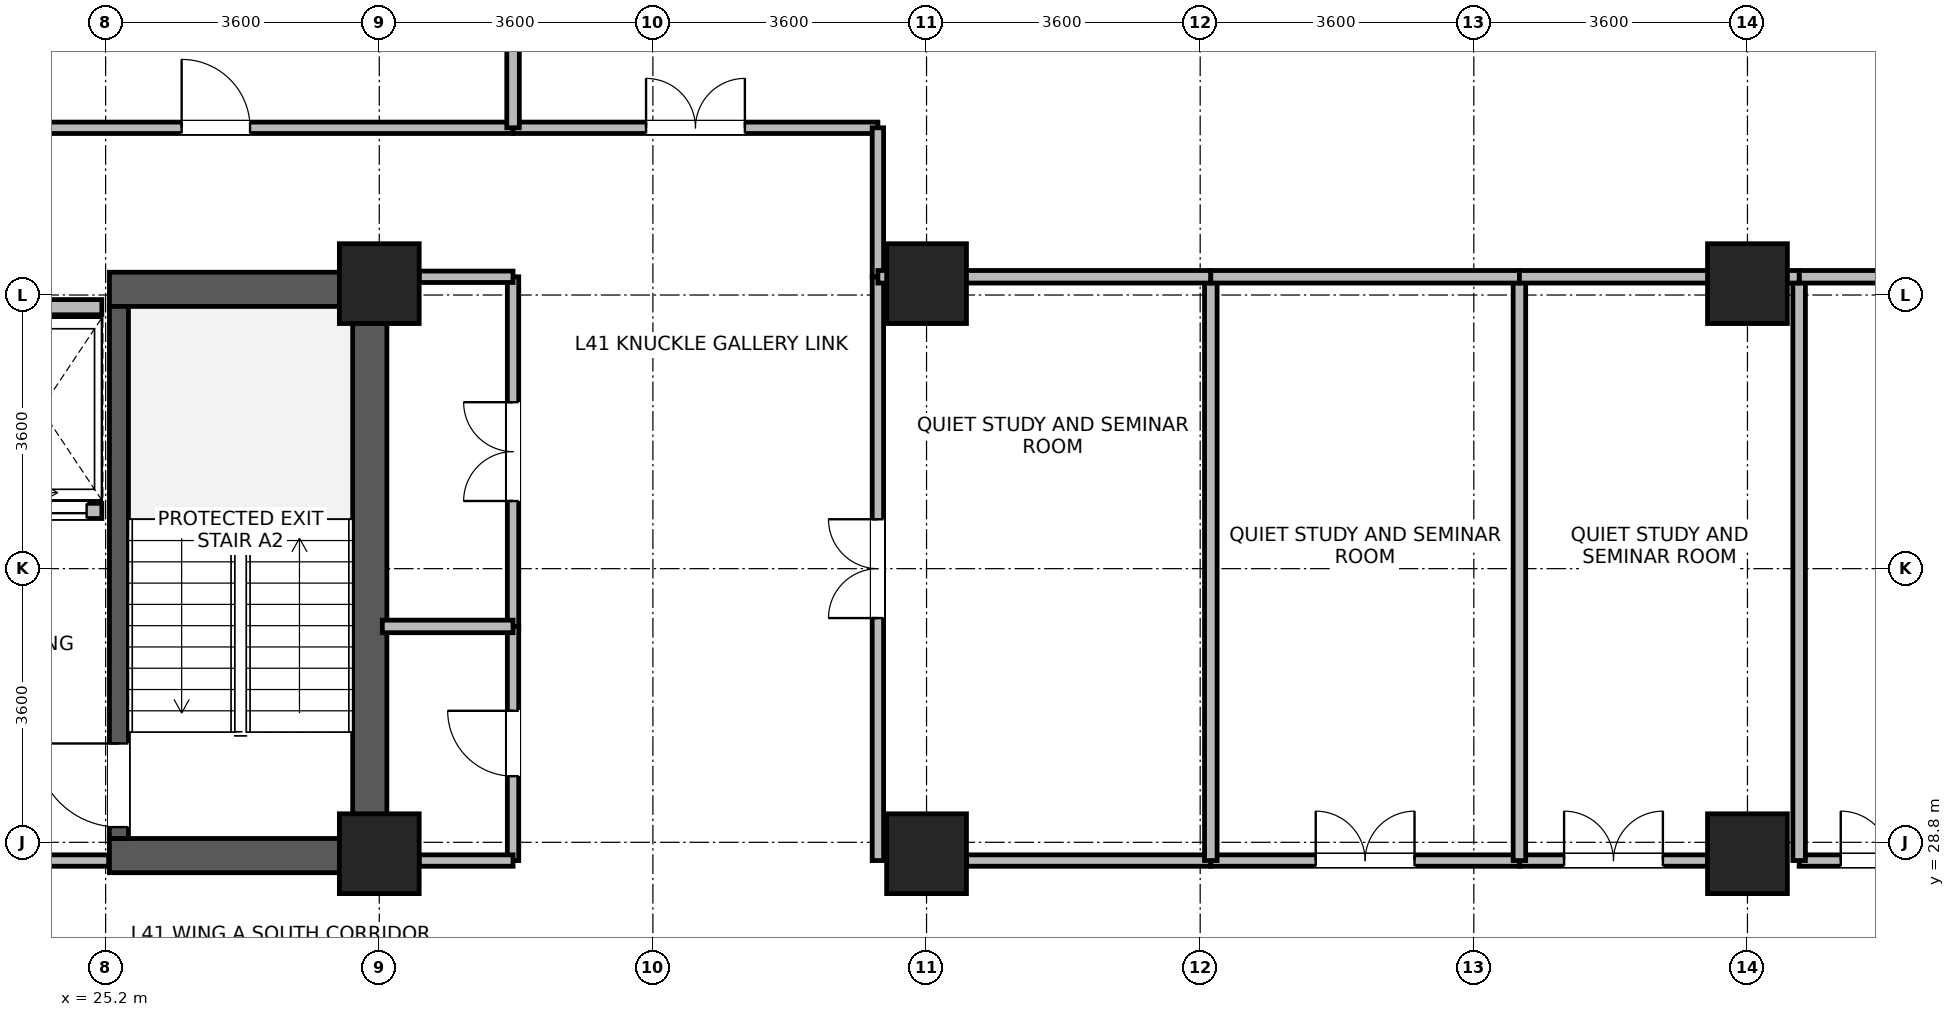
"""IFC4 building model, lengths in metres.
Left out: names, types, materials, properties, quantities, classifications, styles, units other than length and angle.
Written with IfcOpenShell. Run it as: python <this file> out.ifc"""

import sys

from ifc_helpers import new_model, si_unit, direction, frame, frame_2d, origin, origin_2d, place, context, subcontext, project, spatial, rectangle, extrude, source, transform, mapped, element, fill, save


model = new_model("IFC4")
c1 = context("Model", 3, precision=1e-05, world=origin(), true_north=direction((0.0, 1.0)))
c2 = subcontext(c1, "Body", "Model", "MODEL_VIEW")
j1 = project(units=[si_unit("LENGTHUNIT", "METRE"), si_unit("PLANEANGLEUNIT", "RADIAN")], contexts=[c1])
p1 = place(None, origin())
s1 = spatial("IfcSite", under=j1, at=p1, CompositionType="ELEMENT")
p2 = place(p1, origin())
s2 = spatial("IfcBuilding", under=s1, at=p2, CompositionType="ELEMENT")
p3 = place(p2, frame((0.0, 0.0, 162.4)))
s3 = spatial("IfcBuildingStorey", under=s2, at=p3, CompositionType="ELEMENT", Elevation=162.4)
p4 = place(p3, frame((28.675, 28.4, 0.0), z_axis=(0.0, 0.0, 1.0), x_axis=(0.0, 1.0, 0.0)))
e1 = element("IfcWall", 1, at=p4, inside=s3, PredefinedType="SHEAR", context=c2, shape_type="SweptSolid", body=[
    extrude(rectangle(XDim=7.9, YDim=0.45, at=frame_2d((3.95, 0.0))), origin(), (0.0, 0.0, 1.0), 3.46),
])
for number, where, z_axis, x_axis in (
    (2, (25.25, 28.625, 0.0), (0.0, 0.0, 1.0), (1.0, 0.0, 0.0)),
    (3, (25.25, 36.075, 0.0), (0.0, 0.0, 1.0), (1.0, 0.0, 0.0)),
):
    element("IfcWall", number, at=place(p3, frame(where, z_axis=z_axis, x_axis=x_axis)), inside=s3, PredefinedType="SHEAR", context=c2, shape_type="SweptSolid", body=[
        extrude(rectangle(XDim=3.2, YDim=0.45, at=frame_2d((1.6, 0.0))), origin(), (0.0, 0.0, 1.0), 3.46),
    ])
p5 = place(p3, frame((25.375, 28.85, 0.0), z_axis=(0.0, 0.0, 1.0), x_axis=(0.0, 1.0, 0.0)))
e4 = element("IfcWall", 4, at=p5, inside=s3, PredefinedType="SHEAR", context=c2, shape_type="SweptSolid", body=[
    extrude(rectangle(XDim=7.0, YDim=0.25, at=frame_2d((3.5, 0.0))), origin(), (0.0, 0.0, 1.0), 3.46),
])
p6 = place(p5, frame((0.15, 0.0, 0.0)))
e5 = element("IfcOpeningElement", 5, at=p6, cuts=e4, PredefinedType="OPENING", context=c2, shape_type="SweptSolid", body=[
    extrude(rectangle(XDim=1.1, YDim=2.08, at=frame_2d((0.55, 1.04))), frame((0.0, 0.135, 0.0), z_axis=(0.0, -1.0, 0.0), x_axis=(1.0, 0.0, 0.0)), (0.0, 0.0, 1.0), 0.27),
])
m1 = source(origin(), c2, "Body", "SweptSolid", [
    extrude(rectangle(XDim=1.05, YDim=1.05, at=origin_2d()), origin(), (0.0, 0.0, 1.0), 3.7),
])
for number, where, z_axis, x_axis in (
    (6, (28.8, 28.65, 0.0), (0.0, 0.0, 1.0), (1.0, 0.0, 0.0)),
    (7, (28.8, 36.15, 0.0), (0.0, 0.0, 1.0), (1.0, 0.0, 0.0)),
    (8, (36.0, 28.65, 0.0), (0.0, 0.0, 1.0), (1.0, 0.0, 0.0)),
    (9, (36.0, 36.15, 0.0), (0.0, 0.0, 1.0), (1.0, 0.0, 0.0)),
    (10, (46.8, 28.65, 0.0), (0.0, 0.0, 1.0), (1.0, 0.0, 0.0)),
    (11, (46.8, 36.15, 0.0), (0.0, 0.0, 1.0), (1.0, 0.0, 0.0)),
):
    element("IfcColumn", number, at=place(p3, frame(where, z_axis=z_axis, x_axis=x_axis)), inside=s3, PredefinedType="COLUMN", context=c2, shape_type="MappedRepresentation", body=[
        mapped(m1, transform((0.0, 0.0, 0.0), x_axis=(1.0, 0.0, 0.0), y_axis=(0.0, 1.0, 0.0), z_axis=(0.0, 0.0, 1.0), scale=1.0)),
    ])
p7 = place(p3, frame((23.55, 33.16, 0.0), z_axis=(0.0, 0.0, 1.0), x_axis=(1.0, 0.0, 0.0)))
e12 = element("IfcWall", 12, at=p7, inside=s3, PredefinedType="PARTITIONING", context=c2, shape_type="SweptSolid", body=[
    extrude(rectangle(XDim=1.6, YDim=0.2, at=frame_2d((0.8, 0.0))), origin(), (0.0, 0.0, 1.0), 3.44),
])
p8 = place(p7, frame((0.2, 0.0, 0.0)))
e13 = element("IfcOpeningElement", 13, at=p8, cuts=e12, PredefinedType="OPENING", context=c2, shape_type="SweptSolid", body=[
    extrude(rectangle(XDim=1.2, YDim=2.12, at=frame_2d((0.6, 1.06))), frame((0.0, 0.11, 0.0), z_axis=(0.0, -1.0, 0.0), x_axis=(1.0, 0.0, 0.0)), (0.0, 0.0, 1.0), 0.22),
])
p9 = place(p3, frame((23.55, 35.84, 0.0), z_axis=(0.0, 0.0, 1.0), x_axis=(1.0, 0.0, 0.0)))
e14 = element("IfcWall", 14, at=p9, inside=s3, PredefinedType="PARTITIONING", context=c2, shape_type="SweptSolid", body=[
    extrude(rectangle(XDim=1.6, YDim=0.2, at=frame_2d((0.8, 0.0))), origin(), (0.0, 0.0, 1.0), 2.44),
])
p10 = place(p3, frame((22.74, 38.2, 0.0), z_axis=(0.0, 0.0, 1.0), x_axis=(1.0, 0.0, 0.0)))
e15 = element("IfcWall", 15, at=p10, inside=s3, PredefinedType="PARTITIONING", context=c2, shape_type="SweptSolid", body=[
    extrude(rectangle(XDim=7.82, YDim=0.15, at=frame_2d((3.91, 0.0))), origin(), (0.0, 0.0, 1.0), 3.44),
])
p11 = place(p10, frame((3.46, 0.0, 0.0)))
e16 = element("IfcOpeningElement", 16, at=p11, cuts=e15, PredefinedType="OPENING", context=c2, shape_type="SweptSolid", body=[
    extrude(rectangle(XDim=0.9, YDim=2.08, at=frame_2d((0.45, 1.04))), frame((0.0, 0.085, 0.0), z_axis=(0.0, -1.0, 0.0), x_axis=(1.0, 0.0, 0.0)), (0.0, 0.0, 1.0), 0.17),
])
p12 = place(p3, frame((35.36, 28.56, 0.0), z_axis=(0.0, 0.0, 1.0), x_axis=(0.0, 1.0, 0.0)))
e17 = element("IfcWall", 17, at=p12, inside=s3, PredefinedType="PARTITIONING", context=c2, shape_type="SweptSolid", body=[
    extrude(rectangle(XDim=7.68, YDim=0.15, at=frame_2d((3.84, 0.0))), origin(), (0.0, 0.0, 1.0), 3.44),
])
p13 = place(p12, frame((3.19, 0.0, 0.0)))
e18 = element("IfcOpeningElement", 18, at=p13, cuts=e17, PredefinedType="OPENING", context=c2, shape_type="SweptSolid", body=[
    extrude(rectangle(XDim=1.3, YDim=2.12, at=frame_2d((0.65, 1.06))), frame((0.0, 0.085, 0.0), z_axis=(0.0, -1.0, 0.0), x_axis=(1.0, 0.0, 0.0)), (0.0, 0.0, 1.0), 0.17),
])
p14 = place(p3, frame((47.48, 28.56, 0.0), z_axis=(0.0, 0.0, 1.0), x_axis=(1.0, 0.0, 0.0)))
e19 = element("IfcWall", 19, at=p14, inside=s3, PredefinedType="PARTITIONING", context=c2, shape_type="SweptSolid", body=[
    extrude(rectangle(XDim=2.395, YDim=0.15, at=frame_2d((1.198, 0.0))), origin(), (0.0, 0.0, 1.0), 2.84),
])
p15 = place(p14, frame((0.548, 0.0, 0.0)))
e20 = element("IfcOpeningElement", 20, at=p15, cuts=e19, PredefinedType="OPENING", context=c2, shape_type="SweptSolid", body=[
    extrude(rectangle(XDim=1.3, YDim=2.12, at=frame_2d((0.65, 1.06))), frame((0.0, 0.085, 0.0), z_axis=(0.0, -1.0, 0.0), x_axis=(1.0, 0.0, 0.0)), (0.0, 0.0, 1.0), 0.17),
])
p16 = place(p3, frame((30.56, 38.2, 0.0), z_axis=(0.0, 0.0, 1.0), x_axis=(1.0, 0.0, 0.0)))
e21 = element("IfcWall", 21, at=p16, inside=s3, PredefinedType="PARTITIONING", context=c2, shape_type="SweptSolid", body=[
    extrude(rectangle(XDim=4.8, YDim=0.15, at=frame_2d((2.4, 0.0))), origin(), (0.0, 0.0, 1.0), 3.44),
])
p17 = place(p16, frame((1.75, 0.0, 0.0)))
e22 = element("IfcOpeningElement", 22, at=p17, cuts=e21, PredefinedType="OPENING", context=c2, shape_type="SweptSolid", body=[
    extrude(rectangle(XDim=1.3, YDim=2.12, at=frame_2d((0.65, 1.06))), frame((0.0, 0.085, 0.0), z_axis=(0.0, -1.0, 0.0), x_axis=(1.0, 0.0, 0.0)), (0.0, 0.0, 1.0), 0.17),
])
p18 = place(p3, frame((30.56, 31.64, 0.0), z_axis=(0.0, 0.0, 1.0), x_axis=(0.0, 1.0, 0.0)))
e23 = element("IfcWall", 23, at=p18, inside=s3, PredefinedType="PARTITIONING", context=c2, shape_type="SweptSolid", body=[
    extrude(rectangle(XDim=4.6, YDim=0.15, at=frame_2d((2.3, 0.0))), origin(), (0.0, 0.0, 1.0), 3.44),
])
p19 = place(p18, frame((1.65, 0.0, 0.0)))
e24 = element("IfcOpeningElement", 24, at=p19, cuts=e23, PredefinedType="OPENING", context=c2, shape_type="SweptSolid", body=[
    extrude(rectangle(XDim=1.3, YDim=2.12, at=frame_2d((0.65, 1.06))), frame((0.0, 0.085, 0.0), z_axis=(0.0, -1.0, 0.0), x_axis=(1.0, 0.0, 0.0)), (0.0, 0.0, 1.0), 0.17),
])
p20 = place(p3, frame((36.525, 28.56, 0.0), z_axis=(0.0, 0.0, 1.0), x_axis=(1.0, 0.0, 0.0)))
e25 = element("IfcWall", 25, at=p20, inside=s3, PredefinedType="PARTITIONING", context=c2, shape_type="SweptSolid", body=[
    extrude(rectangle(XDim=3.215, YDim=0.15, at=frame_2d((1.607, 0.0))), origin(), (0.0, 0.0, 1.0), 2.84),
])
p21 = place(p3, frame((39.74, 28.56, 0.0), z_axis=(0.0, 0.0, 1.0), x_axis=(1.0, 0.0, 0.0)))
e26 = element("IfcWall", 26, at=p21, inside=s3, PredefinedType="PARTITIONING", context=c2, shape_type="SweptSolid", body=[
    extrude(rectangle(XDim=4.06, YDim=0.15, at=frame_2d((2.03, 0.0))), origin(), (0.0, 0.0, 1.0), 2.84),
])
p22 = place(p21, frame((1.38, 0.0, 0.0)))
e27 = element("IfcOpeningElement", 27, at=p22, cuts=e26, PredefinedType="OPENING", context=c2, shape_type="SweptSolid", body=[
    extrude(rectangle(XDim=1.3, YDim=2.12, at=frame_2d((0.65, 1.06))), frame((0.0, 0.085, 0.0), z_axis=(0.0, -1.0, 0.0), x_axis=(1.0, 0.0, 0.0)), (0.0, 0.0, 1.0), 0.17),
])
p23 = place(p3, frame((43.8, 28.56, 0.0), z_axis=(0.0, 0.0, 1.0), x_axis=(1.0, 0.0, 0.0)))
e28 = element("IfcWall", 28, at=p23, inside=s3, PredefinedType="PARTITIONING", context=c2, shape_type="SweptSolid", body=[
    extrude(rectangle(XDim=2.475, YDim=0.15, at=frame_2d((1.237, 0.0))), origin(), (0.0, 0.0, 1.0), 2.84),
])
p24 = place(p23, frame((0.587, 0.0, 0.0)))
e29 = element("IfcOpeningElement", 29, at=p24, cuts=e28, PredefinedType="OPENING", context=c2, shape_type="SweptSolid", body=[
    extrude(rectangle(XDim=1.3, YDim=2.12, at=frame_2d((0.65, 1.06))), frame((0.0, 0.085, 0.0), z_axis=(0.0, -1.0, 0.0), x_axis=(1.0, 0.0, 0.0)), (0.0, 0.0, 1.0), 0.17),
])
p25 = place(p3, frame((30.56, 28.56, 0.0), z_axis=(0.0, 0.0, 1.0), x_axis=(0.0, 1.0, 0.0)))
e30 = element("IfcWall", 30, at=p25, inside=s3, PredefinedType="PARTITIONING", context=c2, shape_type="SweptSolid", body=[
    extrude(rectangle(XDim=3.08, YDim=0.15, at=frame_2d((1.54, 0.0))), origin(), (0.0, 0.0, 1.0), 3.44),
])
p26 = place(p25, frame((1.11, 0.0, 0.0)))
e31 = element("IfcOpeningElement", 31, at=p26, cuts=e30, PredefinedType="OPENING", context=c2, shape_type="SweptSolid", body=[
    extrude(rectangle(XDim=0.86, YDim=2.02, at=frame_2d((0.43, 1.01))), frame((0.0, 0.085, 0.0), z_axis=(0.0, -1.0, 0.0), x_axis=(1.0, 0.0, 0.0)), (0.0, 0.0, 1.0), 0.17),
])
p27 = place(p3, frame((35.36, 36.24, 0.0), z_axis=(0.0, 0.0, 1.0), x_axis=(0.0, 1.0, 0.0)))
e32 = element("IfcWall", 32, at=p27, inside=s3, PredefinedType="PARTITIONING", context=c2, shape_type="SweptSolid", body=[
    extrude(rectangle(XDim=1.96, YDim=0.15, at=frame_2d((0.98, 0.0))), origin(), (0.0, 0.0, 1.0), 3.44),
])
for number, where, z_axis, x_axis in (
    (33, (29.325, 28.56, 0.0), (0.0, 0.0, 1.0), (1.0, 0.0, 0.0)),
    (34, (29.325, 36.24, 0.0), (0.0, 0.0, 1.0), (1.0, 0.0, 0.0)),
):
    element("IfcWall", number, at=place(p3, frame(where, z_axis=z_axis, x_axis=x_axis)), inside=s3, PredefinedType="PARTITIONING", context=c2, shape_type="SweptSolid", body=[
        extrude(rectangle(XDim=1.235, YDim=0.15, at=frame_2d((0.618, 0.0))), origin(), (0.0, 0.0, 1.0), 2.84),
    ])
for number, where, z_axis, x_axis in (
    (35, (39.74, 28.56, 0.0), (0.0, 0.0, 1.0), (0.0, 1.0, 0.0)),
    (36, (43.8, 28.56, 0.0), (0.0, 0.0, 1.0), (0.0, 1.0, 0.0)),
    (37, (47.48, 28.56, 0.0), (0.0, 0.0, 1.0), (0.0, 1.0, 0.0)),
):
    element("IfcWall", number, at=place(p3, frame(where, z_axis=z_axis, x_axis=x_axis)), inside=s3, PredefinedType="PARTITIONING", context=c2, shape_type="SweptSolid", body=[
        extrude(rectangle(XDim=7.68, YDim=0.165, at=frame_2d((3.84, 0.0))), origin(), (0.0, 0.0, 1.0), 3.44),
    ])
p28 = place(p3, frame((47.48, 36.24, 0.0), z_axis=(0.0, 0.0, 1.0), x_axis=(1.0, 0.0, 0.0)))
e38 = element("IfcWall", 38, at=p28, inside=s3, PredefinedType="PARTITIONING", context=c2, shape_type="SweptSolid", body=[
    extrude(rectangle(XDim=6.888, YDim=0.165, at=frame_2d((3.444, 0.0))), origin(), (0.0, 0.0, 1.0), 2.84),
])
p29 = place(p3, frame((30.56, 38.2, 0.0), z_axis=(0.0, 0.0, 1.0), x_axis=(0.0, 1.0, 0.0)))
e39 = element("IfcWall", 39, at=p29, inside=s3, PredefinedType="PARTITIONING", context=c2, shape_type="SweptSolid", body=[
    extrude(rectangle(XDim=4.868, YDim=0.165, at=frame_2d((2.434, 0.0))), origin(), (0.0, 0.0, 1.0), 3.44),
])
p30 = place(p3, frame((35.36, 36.24, 0.0), z_axis=(0.0, 0.0, 1.0), x_axis=(1.0, 0.0, 0.0)))
e40 = element("IfcWall", 40, at=p30, inside=s3, PredefinedType="PARTITIONING", context=c2, shape_type="SweptSolid", body=[
    extrude(rectangle(XDim=4.38, YDim=0.165, at=frame_2d((2.19, 0.0))), origin(), (0.0, 0.0, 1.0), 2.84),
])
p31 = place(p3, frame((39.74, 36.24, 0.0), z_axis=(0.0, 0.0, 1.0), x_axis=(1.0, 0.0, 0.0)))
e41 = element("IfcWall", 41, at=p31, inside=s3, PredefinedType="PARTITIONING", context=c2, shape_type="SweptSolid", body=[
    extrude(rectangle(XDim=4.06, YDim=0.165, at=frame_2d((2.03, 0.0))), origin(), (0.0, 0.0, 1.0), 2.84),
])
p32 = place(p3, frame((43.8, 36.24, 0.0), z_axis=(0.0, 0.0, 1.0), x_axis=(1.0, 0.0, 0.0)))
e42 = element("IfcWall", 42, at=p32, inside=s3, PredefinedType="PARTITIONING", context=c2, shape_type="SweptSolid", body=[
    extrude(rectangle(XDim=3.68, YDim=0.165, at=frame_2d((1.84, 0.0))), origin(), (0.0, 0.0, 1.0), 2.84),
])
p33 = place(p3, frame((21.76, 28.56, 0.0), z_axis=(0.0, 0.0, 1.0), x_axis=(1.0, 0.0, 0.0)))
e43 = element("IfcWall", 43, at=p33, inside=s3, PredefinedType="PARTITIONING", context=c2, shape_type="SweptSolid", body=[
    extrude(rectangle(XDim=3.48, YDim=0.15, at=frame_2d((1.74, 0.0))), origin(), (0.0, 0.0, 1.0), 2.44),
])
p34 = place(p33, frame((0.99, 0.0, 0.0)))
e44 = element("IfcOpeningElement", 44, at=p34, cuts=e43, PredefinedType="OPENING", context=c2, shape_type="SweptSolid", body=[
    extrude(rectangle(XDim=1.5, YDim=2.1, at=frame_2d((0.75, 1.05))), frame((0.0, 0.085, 0.0), z_axis=(0.0, -1.0, 0.0), x_axis=(1.0, 0.0, 0.0)), (0.0, 0.0, 1.0), 0.17),
])
p35 = place(p3, frame((28.84, 31.64, 0.0), z_axis=(0.0, 0.0, 1.0), x_axis=(1.0, 0.0, 0.0)))
e45 = element("IfcWall", 45, at=p35, inside=s3, PredefinedType="PARTITIONING", context=c2, shape_type="SweptSolid", body=[
    extrude(rectangle(XDim=1.72, YDim=0.165, at=frame_2d((0.86, 0.0))), origin(), (0.0, 0.0, 1.0), 3.44),
])
p36 = place(p6, origin())
e46 = element("IfcDoor", 46, at=p36, inside=s3, OperationType="SINGLE_SWING_RIGHT", PredefinedType="DOOR", context=c2, shape_type="SweptSolid", body=[
    extrude(rectangle(XDim=1.1, YDim=2.08, at=frame_2d((0.55, 1.04))), frame((0.0, 0.025, 0.0), z_axis=(0.0, -1.0, 0.0), x_axis=(1.0, 0.0, 0.0)), (0.0, 0.0, 1.0), 0.05),
])
fill(e5, e46)
p37 = place(p8, origin())
e47 = element("IfcDoor", 47, at=p37, inside=s3, OperationType="SLIDING_TO_RIGHT", PredefinedType="DOOR", context=c2, shape_type="SweptSolid", body=[
    extrude(rectangle(XDim=1.2, YDim=2.12, at=frame_2d((0.6, 1.06))), frame((0.0, 0.025, 0.0), z_axis=(0.0, -1.0, 0.0), x_axis=(1.0, 0.0, 0.0)), (0.0, 0.0, 1.0), 0.05),
])
fill(e13, e47)
p38 = place(p11, origin())
e48 = element("IfcDoor", 48, at=p38, inside=s3, OperationType="SINGLE_SWING_LEFT", PredefinedType="DOOR", context=c2, shape_type="SweptSolid", body=[
    extrude(rectangle(XDim=0.9, YDim=2.08, at=frame_2d((0.45, 1.04))), frame((0.0, 0.025, 0.0), z_axis=(0.0, -1.0, 0.0), x_axis=(1.0, 0.0, 0.0)), (0.0, 0.0, 1.0), 0.05),
])
fill(e16, e48)
p39 = place(p13, origin())
e49 = element("IfcDoor", 49, at=p39, inside=s3, OperationType="DOUBLE_DOOR_SINGLE_SWING", PredefinedType="DOOR", context=c2, shape_type="SweptSolid", body=[
    extrude(rectangle(XDim=1.3, YDim=2.12, at=frame_2d((0.65, 1.06))), frame((0.0, 0.025, 0.0), z_axis=(0.0, -1.0, 0.0), x_axis=(1.0, 0.0, 0.0)), (0.0, 0.0, 1.0), 0.05),
])
fill(e18, e49)
p40 = place(p15, origin())
e50 = element("IfcDoor", 50, at=p40, inside=s3, OperationType="DOUBLE_DOOR_SINGLE_SWING", PredefinedType="DOOR", context=c2, shape_type="SweptSolid", body=[
    extrude(rectangle(XDim=1.3, YDim=2.12, at=frame_2d((0.65, 1.06))), frame((0.0, 0.025, 0.0), z_axis=(0.0, -1.0, 0.0), x_axis=(1.0, 0.0, 0.0)), (0.0, 0.0, 1.0), 0.05),
])
fill(e20, e50)
p41 = place(p17, origin())
e51 = element("IfcDoor", 51, at=p41, inside=s3, OperationType="DOUBLE_DOOR_SINGLE_SWING", PredefinedType="DOOR", context=c2, shape_type="SweptSolid", body=[
    extrude(rectangle(XDim=1.3, YDim=2.12, at=frame_2d((0.65, 1.06))), frame((0.0, 0.025, 0.0), z_axis=(0.0, -1.0, 0.0), x_axis=(1.0, 0.0, 0.0)), (0.0, 0.0, 1.0), 0.05),
])
fill(e22, e51)
p42 = place(p19, origin())
e52 = element("IfcDoor", 52, at=p42, inside=s3, OperationType="DOUBLE_DOOR_SINGLE_SWING", PredefinedType="DOOR", context=c2, shape_type="SweptSolid", body=[
    extrude(rectangle(XDim=1.3, YDim=2.12, at=frame_2d((0.65, 1.06))), frame((0.0, 0.025, 0.0), z_axis=(0.0, -1.0, 0.0), x_axis=(1.0, 0.0, 0.0)), (0.0, 0.0, 1.0), 0.05),
])
fill(e24, e52)
p43 = place(p22, origin())
e53 = element("IfcDoor", 53, at=p43, inside=s3, OperationType="DOUBLE_DOOR_SINGLE_SWING", PredefinedType="DOOR", context=c2, shape_type="SweptSolid", body=[
    extrude(rectangle(XDim=1.3, YDim=2.12, at=frame_2d((0.65, 1.06))), frame((0.0, 0.025, 0.0), z_axis=(0.0, -1.0, 0.0), x_axis=(1.0, 0.0, 0.0)), (0.0, 0.0, 1.0), 0.05),
])
fill(e27, e53)
p44 = place(p24, origin())
e54 = element("IfcDoor", 54, at=p44, inside=s3, OperationType="DOUBLE_DOOR_SINGLE_SWING", PredefinedType="DOOR", context=c2, shape_type="SweptSolid", body=[
    extrude(rectangle(XDim=1.3, YDim=2.12, at=frame_2d((0.65, 1.06))), frame((0.0, 0.025, 0.0), z_axis=(0.0, -1.0, 0.0), x_axis=(1.0, 0.0, 0.0)), (0.0, 0.0, 1.0), 0.05),
])
fill(e29, e54)
p45 = place(p26, origin())
e55 = element("IfcDoor", 55, at=p45, inside=s3, OperationType="SINGLE_SWING_RIGHT", PredefinedType="DOOR", context=c2, shape_type="SweptSolid", body=[
    extrude(rectangle(XDim=0.86, YDim=2.02, at=frame_2d((0.43, 1.01))), frame((0.0, 0.025, 0.0), z_axis=(0.0, -1.0, 0.0), x_axis=(1.0, 0.0, 0.0)), (0.0, 0.0, 1.0), 0.05),
])
fill(e31, e55)
save(model, sys.argv[1])
